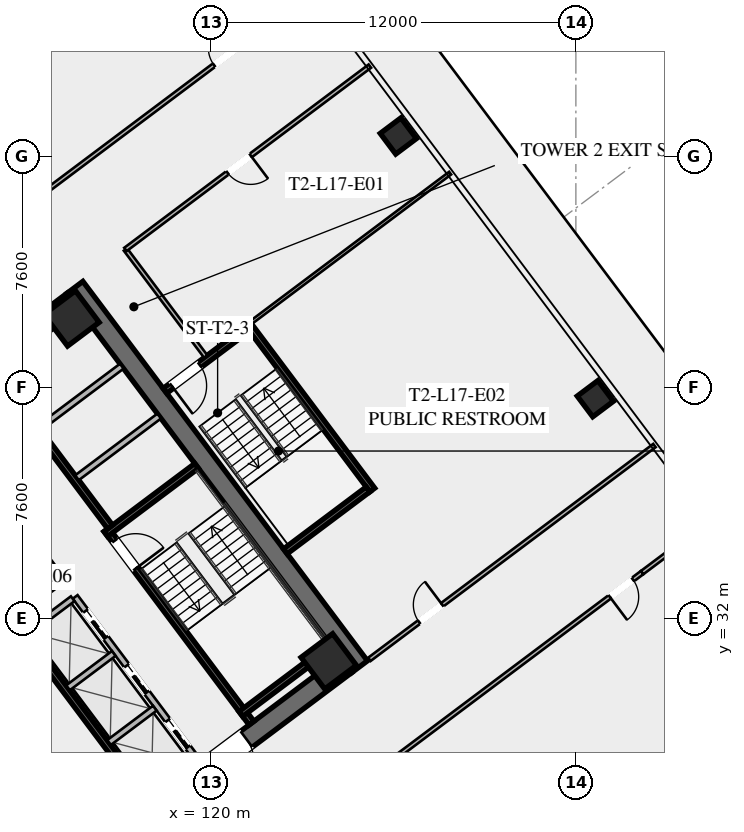
"""IFC4 building model, lengths in metres.
Left out: names, types, materials, properties, quantities, classifications, styles, units other than length and angle.
Written with IfcOpenShell. Run it as: python <this file> out.ifc"""

import sys

from ifc_helpers import new_model, si_unit, direction, frame, frame_2d, origin, origin_2d, place, context, subcontext, project, spatial, rectangle, hollow_rectangle, extrude, element, fill, save


model = new_model("IFC4")
c1 = context("Model", 3, precision=1e-05, world=origin(), true_north=direction((0.0, 1.0)))
c2 = subcontext(c1, "Body", "Model", "MODEL_VIEW")
j1 = project(units=[si_unit("LENGTHUNIT", "METRE"), si_unit("PLANEANGLEUNIT", "RADIAN")], contexts=[c1])
p1 = place(None, origin())
s1 = spatial("IfcSite", under=j1, at=p1, CompositionType="ELEMENT")
p2 = place(p1, origin())
s2 = spatial("IfcBuilding", under=s1, at=p2, CompositionType="ELEMENT")
p3 = place(p2, frame((0.0, 0.0, 67.2)))
s3 = spatial("IfcBuildingStorey", under=s2, at=p3, CompositionType="ELEMENT", Elevation=67.2)
p4 = place(p3, frame((115.524, 42.893, 0.0), z_axis=(0.0, 0.0, 1.0), x_axis=(0.600005007985, -0.799996243986, 0.0)))
e1 = element("IfcWall", 1, at=p4, inside=s3, PredefinedType="SHEAR", context=c2, shape_type="SweptSolid", body=[
    extrude(rectangle(XDim=15.6, YDim=0.65, at=frame_2d((7.8, 0.0))), origin(), (0.0, 0.0, 1.0), 3.55),
])
p5 = place(p3, frame((124.429, 30.478, 0.0), z_axis=(0.0, 0.0, 1.0), x_axis=(-0.799998028465, -0.600002628705, 0.0)))
e2 = element("IfcWall", 2, at=p5, inside=s3, PredefinedType="SHEAR", context=c2, shape_type="SweptSolid", body=[
    extrude(rectangle(XDim=14.86, YDim=0.65, at=frame_2d((7.43, 0.0))), origin(), (0.0, 0.0, 1.0), 3.55),
])
p6 = place(p5, frame((9.13, 0.0, 0.0)))
e3 = element("IfcOpeningElement", 3, at=p6, cuts=e2, PredefinedType="OPENING", context=c2, shape_type="SweptSolid", body=[
    extrude(rectangle(XDim=1.25, YDim=2.25, at=frame_2d((0.625, 1.125))), frame((0.0, 0.335, 0.0), z_axis=(0.0, -1.0, 0.0), x_axis=(1.0, 0.0, 0.0)), (0.0, 0.0, 1.0), 0.67),
])
p7 = place(p5, frame((4.08, 0.0, 0.0)))
e4 = element("IfcOpeningElement", 4, at=p7, cuts=e2, PredefinedType="OPENING", context=c2, shape_type="SweptSolid", body=[
    extrude(rectangle(XDim=1.25, YDim=2.25, at=frame_2d((0.625, 1.125))), frame((0.0, 0.335, 0.0), z_axis=(0.0, -1.0, 0.0), x_axis=(1.0, 0.0, 0.0)), (0.0, 0.0, 1.0), 0.67),
])
p8 = place(p3, frame((103.571, 33.522, 0.0), z_axis=(0.0, 0.0, 1.0), x_axis=(0.799998028465, 0.600002628705, 0.0)))
e5 = element("IfcWall", 5, at=p8, inside=s3, PredefinedType="SHEAR", context=c2, shape_type="SweptSolid", body=[
    extrude(rectangle(XDim=14.86, YDim=0.65, at=frame_2d((7.43, 0.0))), origin(), (0.0, 0.0, 1.0), 3.55),
])
p9 = place(p8, frame((4.48, 0.0, 0.0)))
e6 = element("IfcOpeningElement", 6, at=p9, cuts=e5, PredefinedType="OPENING", context=c2, shape_type="SweptSolid", body=[
    extrude(rectangle(XDim=1.25, YDim=2.25, at=frame_2d((0.625, 1.125))), frame((0.0, 0.335, 0.0), z_axis=(0.0, -1.0, 0.0), x_axis=(1.0, 0.0, 0.0)), (0.0, 0.0, 1.0), 0.67),
])
p10 = place(p8, frame((9.53, 0.0, 0.0)))
e7 = element("IfcOpeningElement", 7, at=p10, cuts=e5, PredefinedType="OPENING", context=c2, shape_type="SweptSolid", body=[
    extrude(rectangle(XDim=1.25, YDim=2.25, at=frame_2d((0.625, 1.125))), frame((0.0, 0.335, 0.0), z_axis=(0.0, -1.0, 0.0), x_axis=(1.0, 0.0, 0.0)), (0.0, 0.0, 1.0), 0.67),
])
for number, where, z_axis, x_axis in (
    (8, (123.87, 30.59, 0.0), (0.0, 0.0, 1.0), (0.8, 0.6, 0.0)),
    (9, (115.41, 41.87, 0.0), (0.0, 0.0, 1.0), (0.8, 0.6, 0.0)),
):
    element("IfcColumn", number, at=place(p3, frame(where, z_axis=z_axis, x_axis=x_axis)), inside=s3, PredefinedType="COLUMN", context=c2, shape_type="SweptSolid", body=[
        extrude(hollow_rectangle(XDim=1.3, YDim=1.3, WallThickness=0.05, at=origin_2d()), origin(), (0.0, 0.0, 1.0), 3.35),
    ])
for number, where, z_axis, x_axis in (
    (10, (132.64, 39.23, -0.195), (0.0, 0.0, 1.0), (0.8, 0.6, 0.0)),
    (11, (126.16, 47.87, -0.195), (0.0, 0.0, 1.0), (0.8, 0.6, 0.0)),
):
    element("IfcColumn", number, at=place(p3, frame(where, z_axis=z_axis, x_axis=x_axis)), inside=s3, PredefinedType="COLUMN", context=c2, shape_type="SweptSolid", body=[
        extrude(hollow_rectangle(XDim=0.85, YDim=0.85, WallThickness=0.035, at=origin_2d()), origin(), (0.0, 0.0, 1.0), 3.545),
    ])
p11 = place(p3, frame((116.56, 34.92, 0.0), z_axis=(0.0, 0.0, 1.0), x_axis=(0.600009827119, -0.799992629566, 0.0)))
e12 = element("IfcWall", 12, at=p11, inside=s3, PredefinedType="SHEAR", context=c2, shape_type="SweptSolid", body=[
    extrude(rectangle(XDim=7.95, YDim=0.2, at=frame_2d((3.975, 0.0))), origin(), (0.0, 0.0, 1.0), 3.35),
])
p12 = place(p11, frame((0.45, 0.0, 0.0)))
e13 = element("IfcOpeningElement", 13, at=p12, cuts=e12, PredefinedType="OPENING", context=c2, shape_type="SweptSolid", body=[
    extrude(rectangle(XDim=1.15, YDim=2.2, at=frame_2d((0.575, 1.1))), frame((0.0, 0.11, 0.0), z_axis=(0.0, -1.0, 0.0), x_axis=(1.0, 0.0, 0.0)), (0.0, 0.0, 1.0), 0.22),
])
for number, where, z_axis, x_axis in (
    (14, (116.54, 34.78, 0.0), (0.0, 0.0, 1.0), (0.8, 0.6, 0.0)),
    (15, (120.98, 28.86, 0.0), (0.0, 0.0, 1.0), (0.8, 0.6, 0.0)),
):
    element("IfcWall", number, at=place(p3, frame(where, z_axis=z_axis, x_axis=x_axis)), inside=s3, PredefinedType="SHEAR", context=c2, shape_type="SweptSolid", body=[
        extrude(rectangle(XDim=3.73, YDim=0.2, at=frame_2d((1.865, 0.0))), origin(), (0.0, 0.0, 1.0), 3.35),
    ])
p13 = place(p3, frame((117.938, 26.016, 0.0), z_axis=(0.0, 0.0, 1.0), x_axis=(-0.600005463273, 0.799995902516, 0.0)))
e16 = element("IfcWall", 16, at=p13, inside=s3, PredefinedType="SHEAR", context=c2, shape_type="SweptSolid", body=[
    extrude(rectangle(XDim=14.3, YDim=0.2, at=frame_2d((7.15, 0.0))), origin(), (0.0, 0.0, 1.0), 3.35),
])
p14 = place(p3, frame((115.13, 23.91, 0.0), z_axis=(0.0, 0.0, 1.0), x_axis=(-0.599975393228, 0.800018454488, 0.0)))
e17 = element("IfcWall", 17, at=p14, inside=s3, PredefinedType="SHEAR", context=c2, shape_type="SweptSolid", body=[
    extrude(rectangle(XDim=6.35, YDim=0.2, at=frame_2d((3.175, 0.0))), origin(), (0.0, 0.0, 1.0), 3.35),
])
p15 = place(p14, frame((4.775, 0.0, 0.0)))
e18 = element("IfcOpeningElement", 18, at=p15, cuts=e17, PredefinedType="OPENING", context=c2, shape_type="SweptSolid", body=[
    extrude(rectangle(XDim=1.3, YDim=2.25, at=frame_2d((0.65, 1.125))), frame((0.0, 0.11, 0.0), z_axis=(0.0, -1.0, 0.0), x_axis=(1.0, 0.0, 0.0)), (0.0, 0.0, 1.0), 0.22),
])
p16 = place(p14, frame((2.775, 0.0, 0.0)))
e19 = element("IfcOpeningElement", 19, at=p16, cuts=e17, PredefinedType="OPENING", context=c2, shape_type="SweptSolid", body=[
    extrude(rectangle(XDim=1.3, YDim=2.25, at=frame_2d((0.65, 1.125))), frame((0.0, 0.11, 0.0), z_axis=(0.0, -1.0, 0.0), x_axis=(1.0, 0.0, 0.0)), (0.0, 0.0, 1.0), 0.22),
])
p17 = place(p14, frame((0.575, 0.0, 0.0)))
e20 = element("IfcOpeningElement", 20, at=p17, cuts=e17, PredefinedType="OPENING", context=c2, shape_type="SweptSolid", body=[
    extrude(rectangle(XDim=1.3, YDim=2.25, at=frame_2d((0.65, 1.125))), frame((0.0, 0.11, 0.0), z_axis=(0.0, -1.0, 0.0), x_axis=(1.0, 0.0, 0.0)), (0.0, 0.0, 1.0), 0.22),
])
p18 = place(p3, frame((112.87, 40.09, 0.0), z_axis=(0.0, 0.0, 1.0), x_axis=(0.599975393228, -0.800018454488, 0.0)))
e21 = element("IfcWall", 21, at=p18, inside=s3, PredefinedType="SHEAR", context=c2, shape_type="SweptSolid", body=[
    extrude(rectangle(XDim=6.35, YDim=0.2, at=frame_2d((3.175, 0.0))), origin(), (0.0, 0.0, 1.0), 3.35),
])
for number, where, z_axis, x_axis in (
    (22, (115.59, 36.63, 0.0), (0.0, 0.0, 1.0), (0.8, 0.6, 0.0)),
    (23, (114.36, 38.27, 0.0), (0.0, 0.0, 1.0), (0.8, 0.6, 0.0)),
):
    element("IfcWall", number, at=place(p3, frame(where, z_axis=z_axis, x_axis=x_axis)), inside=s3, PredefinedType="SOLIDWALL", context=c2, shape_type="SweptSolid", body=[
        extrude(rectangle(XDim=3.38, YDim=0.2, at=frame_2d((1.69, 0.0))), origin(), (0.0, 0.0, 1.0), 3.35),
    ])
p19 = place(p3, frame((119.61, 27.27, 0.0), z_axis=(0.0, 0.0, 1.0), x_axis=(-0.600011488909, 0.79999138319, 0.0)))
e24 = element("IfcWall", 24, at=p19, inside=s3, PredefinedType="SOLIDWALL", context=c2, shape_type="SweptSolid", body=[
    extrude(rectangle(XDim=6.8, YDim=0.2, at=frame_2d((3.4, 0.0))), origin(), (0.0, 0.0, 1.0), 3.35),
])
p20 = place(p19, frame((0.625, 0.0, 0.0)))
e25 = element("IfcOpeningElement", 25, at=p20, cuts=e24, PredefinedType="OPENING", context=c2, shape_type="SweptSolid", body=[
    extrude(rectangle(XDim=1.1, YDim=2.2, at=frame_2d((0.55, 1.1))), frame((0.0, 0.11, 0.0), z_axis=(0.0, -1.0, 0.0), x_axis=(1.0, 0.0, 0.0)), (0.0, 0.0, 1.0), 0.22),
])
p21 = place(p19, frame((2.875, 0.0, 0.0)))
e26 = element("IfcOpeningElement", 26, at=p21, cuts=e24, PredefinedType="OPENING", context=c2, shape_type="SweptSolid", body=[
    extrude(rectangle(XDim=1.1, YDim=2.2, at=frame_2d((0.55, 1.1))), frame((0.0, 0.11, 0.0), z_axis=(0.0, -1.0, 0.0), x_axis=(1.0, 0.0, 0.0)), (0.0, 0.0, 1.0), 0.22),
])
p22 = place(p19, frame((5.125, 0.0, 0.0)))
e27 = element("IfcOpeningElement", 27, at=p22, cuts=e24, PredefinedType="OPENING", context=c2, shape_type="SweptSolid", body=[
    extrude(rectangle(XDim=1.1, YDim=2.2, at=frame_2d((0.55, 1.1))), frame((0.0, 0.11, 0.0), z_axis=(0.0, -1.0, 0.0), x_axis=(1.0, 0.0, 0.0)), (0.0, 0.0, 1.0), 0.22),
])
p23 = place(p3, frame((116.646, 27.922, 0.0), z_axis=(0.0, 0.0, 1.0), x_axis=(0.8, 0.6, 0.0)))
e28 = element("IfcWall", 28, at=p23, inside=s3, PredefinedType="SOLIDWALL", context=c2, shape_type="SweptSolid", body=[
    extrude(rectangle(XDim=1.88, YDim=0.2, at=frame_2d((0.94, 0.0))), origin(), (0.0, 0.0, 1.0), 3.35),
])
p24 = place(p3, frame((115.296, 29.722, 0.0), z_axis=(0.0, 0.0, 1.0), x_axis=(0.799984418148, 0.600020775241, 0.0)))
e29 = element("IfcWall", 29, at=p24, inside=s3, PredefinedType="SOLIDWALL", context=c2, shape_type="SweptSolid", body=[
    extrude(rectangle(XDim=1.88, YDim=0.2, at=frame_2d((0.94, 0.0))), origin(), (0.0, 0.0, 1.0), 3.35),
])
p25 = place(p3, frame((113.946, 31.522, 0.0), z_axis=(0.0, 0.0, 1.0), x_axis=(0.8, 0.6, 0.0)))
e30 = element("IfcWall", 30, at=p25, inside=s3, PredefinedType="SOLIDWALL", context=c2, shape_type="SweptSolid", body=[
    extrude(rectangle(XDim=1.88, YDim=0.2, at=frame_2d((0.94, 0.0))), origin(), (0.0, 0.0, 1.0), 3.35),
])
p26 = place(p3, frame((115.11, 33.27, 0.0), z_axis=(0.0, 0.0, 1.0), x_axis=(-0.600011488909, 0.79999138319, 0.0)))
e31 = element("IfcWall", 31, at=p26, inside=s3, PredefinedType="SOLIDWALL", context=c2, shape_type="SweptSolid", body=[
    extrude(rectangle(XDim=6.8, YDim=0.2, at=frame_2d((3.4, 0.0))), origin(), (0.0, 0.0, 1.0), 3.35),
])
p27 = place(p3, frame((113.526, 32.082, 0.0), z_axis=(0.0, 0.0, 1.0), x_axis=(0.800046745961, 0.599937666993, 0.0)))
e32 = element("IfcWall", 32, at=p27, inside=s3, PredefinedType="SOLIDWALL", context=c2, shape_type="SweptSolid", body=[
    extrude(rectangle(XDim=1.88, YDim=0.2, at=frame_2d((0.94, 0.0))), origin(), (0.0, 0.0, 1.0), 3.35),
])
p28 = place(p3, frame((125.304, 36.228, 0.0), z_axis=(0.0, 0.0, 1.0), x_axis=(-0.59998851072, 0.800008616831, 0.0)))
e33 = element("IfcWall", 33, at=p28, inside=s3, PredefinedType="SHEAR", context=c2, shape_type="SweptSolid", body=[
    extrude(rectangle(XDim=6.8, YDim=0.2, at=frame_2d((3.4, 0.0))), origin(), (0.0, 0.0, 1.0), 3.35),
])
p29 = place(p3, frame((121.204, 41.528, 0.0), z_axis=(0.0, 0.0, 1.0), x_axis=(-0.800017232136, -0.599977023131, 0.0)))
e34 = element("IfcWall", 34, at=p29, inside=s3, PredefinedType="SHEAR", context=c2, shape_type="SweptSolid", body=[
    extrude(rectangle(XDim=3.4, YDim=0.2, at=frame_2d((1.7, 0.0))), origin(), (0.0, 0.0, 1.0), 3.35),
])
p30 = place(p29, frame((1.975, 0.0, 0.0)))
e35 = element("IfcOpeningElement", 35, at=p30, cuts=e34, PredefinedType="OPENING", context=c2, shape_type="SweptSolid", body=[
    extrude(rectangle(XDim=1.15, YDim=2.2, at=frame_2d((0.575, 1.1))), frame((0.0, 0.11, 0.0), z_axis=(0.0, -1.0, 0.0), x_axis=(1.0, 0.0, 0.0)), (0.0, 0.0, 1.0), 0.22),
])
p31 = place(p3, frame((122.444, 34.208, 0.0), z_axis=(0.0, 0.0, 1.0), x_axis=(0.79999138319, 0.600011488909, 0.0)))
e36 = element("IfcWall", 36, at=p31, inside=s3, PredefinedType="SHEAR", context=c2, shape_type="SweptSolid", body=[
    extrude(rectangle(XDim=3.4, YDim=0.2, at=frame_2d((1.7, 0.0))), origin(), (0.0, 0.0, 1.0), 3.35),
])
p32 = place(p3, frame((119.824, 40.618, 0.0), z_axis=(0.0, 0.0, 1.0), x_axis=(-0.599982243973, 0.800013316712, 0.0)))
e37 = element("IfcWall", 37, at=p32, inside=s3, PredefinedType="PARTITIONING", context=c2, shape_type="SweptSolid", body=[
    extrude(rectangle(XDim=4.4, YDim=0.135, at=frame_2d((2.2, 0.0))), origin(), (0.0, 0.0, 1.0), 2.703),
])
p33 = place(p3, frame((98.516, 34.012, 0.0), z_axis=(0.0, 0.0, 1.0), x_axis=(0.8, 0.6, 0.0)))
e38 = element("IfcWall", 38, at=p33, inside=s3, PredefinedType="PARTITIONING", context=c2, shape_type="SweptSolid", body=[
    extrude(rectangle(XDim=28.23, YDim=0.135, at=frame_2d((14.115, 0.0))), origin(), (0.0, 0.0, 1.0), 2.703),
])
p34 = place(p33, frame((0.3, 0.0, 0.0)))
e39 = element("IfcOpeningElement", 39, at=p34, cuts=e38, PredefinedType="OPENING", context=c2, shape_type="SweptSolid", body=[
    extrude(rectangle(XDim=0.95, YDim=2.05, at=frame_2d((0.475, 1.025))), frame((0.0, 0.077, 0.0), z_axis=(0.0, -1.0, 0.0), x_axis=(1.0, 0.0, 0.0)), (0.0, 0.0, 1.0), 0.155),
])
p35 = place(p33, frame((6.84, 0.0, 0.0)))
e40 = element("IfcOpeningElement", 40, at=p35, cuts=e38, PredefinedType="OPENING", context=c2, shape_type="SweptSolid", body=[
    extrude(rectangle(XDim=0.95, YDim=2.05, at=frame_2d((0.475, 1.025))), frame((0.0, 0.077, 0.0), z_axis=(0.0, -1.0, 0.0), x_axis=(1.0, 0.0, 0.0)), (0.0, 0.0, 1.0), 0.155),
])
p36 = place(p33, frame((10.863, 0.0, 0.0)))
e41 = element("IfcOpeningElement", 41, at=p36, cuts=e38, PredefinedType="OPENING", context=c2, shape_type="SweptSolid", body=[
    extrude(rectangle(XDim=0.95, YDim=2.05, at=frame_2d((0.475, 1.025))), frame((0.0, 0.077, 0.0), z_axis=(0.0, -1.0, 0.0), x_axis=(1.0, 0.0, 0.0)), (0.0, 0.0, 1.0), 0.155),
])
p37 = place(p33, frame((26.98, 0.0, 0.0)))
e42 = element("IfcOpeningElement", 42, at=p37, cuts=e38, PredefinedType="OPENING", context=c2, shape_type="SweptSolid", body=[
    extrude(rectangle(XDim=0.95, YDim=2.05, at=frame_2d((0.475, 1.025))), frame((0.0, 0.077, 0.0), z_axis=(0.0, -1.0, 0.0), x_axis=(1.0, 0.0, 0.0)), (0.0, 0.0, 1.0), 0.155),
])
p38 = place(p3, frame((134.18, 33.51, 0.0), z_axis=(0.0, 0.0, 1.0), x_axis=(-0.8, -0.6, 0.0)))
e43 = element("IfcWall", 43, at=p38, inside=s3, PredefinedType="PARTITIONING", context=c2, shape_type="SweptSolid", body=[
    extrude(rectangle(XDim=28.23, YDim=0.135, at=frame_2d((14.115, 0.0))), origin(), (0.0, 0.0, 1.0), 2.703),
])
p39 = place(p38, frame((26.9, 0.0, 0.0)))
e44 = element("IfcOpeningElement", 44, at=p39, cuts=e43, PredefinedType="OPENING", context=c2, shape_type="SweptSolid", body=[
    extrude(rectangle(XDim=0.95, YDim=2.05, at=frame_2d((0.475, 1.025))), frame((0.0, 0.077, 0.0), z_axis=(0.0, -1.0, 0.0), x_axis=(1.0, 0.0, 0.0)), (0.0, 0.0, 1.0), 0.155),
])
p40 = place(p38, frame((20.399, 0.0, 0.0)))
e45 = element("IfcOpeningElement", 45, at=p40, cuts=e43, PredefinedType="OPENING", context=c2, shape_type="SweptSolid", body=[
    extrude(rectangle(XDim=0.95, YDim=2.05, at=frame_2d((0.475, 1.025))), frame((0.0, 0.077, 0.0), z_axis=(0.0, -1.0, 0.0), x_axis=(1.0, 0.0, 0.0)), (0.0, 0.0, 1.0), 0.155),
])
p41 = place(p38, frame((16.339, 0.0, 0.0)))
e46 = element("IfcOpeningElement", 46, at=p41, cuts=e43, PredefinedType="OPENING", context=c2, shape_type="SweptSolid", body=[
    extrude(rectangle(XDim=0.95, YDim=2.05, at=frame_2d((0.475, 1.025))), frame((0.0, 0.077, 0.0), z_axis=(0.0, -1.0, 0.0), x_axis=(1.0, 0.0, 0.0)), (0.0, 0.0, 1.0), 0.155),
])
p42 = place(p38, frame((0.38, 0.0, 0.0)))
e47 = element("IfcOpeningElement", 47, at=p42, cuts=e43, PredefinedType="OPENING", context=c2, shape_type="SweptSolid", body=[
    extrude(rectangle(XDim=0.95, YDim=2.05, at=frame_2d((0.475, 1.025))), frame((0.0, 0.077, 0.0), z_axis=(0.0, -1.0, 0.0), x_axis=(1.0, 0.0, 0.0)), (0.0, 0.0, 1.0), 0.155),
])
p43 = place(p3, frame((134.18, 33.51, 0.0), z_axis=(0.0, 0.0, 1.0), x_axis=(0.8000207031, 0.599972394874, 0.0)))
e48 = element("IfcWall", 48, at=p43, inside=s3, PredefinedType="PARTITIONING", context=c2, shape_type="SweptSolid", body=[
    extrude(rectangle(XDim=2.83, YDim=0.135, at=frame_2d((1.415, 0.0))), origin(), (0.0, 0.0, 1.0), 2.703),
])
p44 = place(p3, frame((125.224, 50.168, 0.0), z_axis=(0.0, 0.0, 1.0), x_axis=(-0.8, -0.6, 0.0)))
e49 = element("IfcWall", 49, at=p44, inside=s3, PredefinedType="PARTITIONING", context=c2, shape_type="SweptSolid", body=[
    extrude(rectangle(XDim=10.05, YDim=0.135, at=frame_2d((5.025, 0.0))), origin(), (0.0, 0.0, 1.0), 2.703),
])
p45 = place(p44, frame((4.9, 0.0, 0.0)))
e50 = element("IfcOpeningElement", 50, at=p45, cuts=e49, PredefinedType="OPENING", context=c2, shape_type="SweptSolid", body=[
    extrude(rectangle(XDim=0.95, YDim=2.05, at=frame_2d((0.475, 1.025))), frame((0.0, 0.077, 0.0), z_axis=(0.0, -1.0, 0.0), x_axis=(1.0, 0.0, 0.0)), (0.0, 0.0, 1.0), 0.155),
])
p46 = place(p3, frame((125.208, 30.656, 0.0), z_axis=(0.0, 0.0, 1.0), x_axis=(0.8, 0.6, 0.0)))
e51 = element("IfcWall", 51, at=p46, inside=s3, PredefinedType="PARTITIONING", context=c2, shape_type="SweptSolid", body=[
    extrude(rectangle(XDim=11.72, YDim=0.135, at=frame_2d((5.86, 0.0))), origin(), (0.0, 0.0, 1.0), 2.703),
])
p47 = place(p46, frame((2.045, 0.0, 0.0)))
e52 = element("IfcOpeningElement", 52, at=p47, cuts=e51, PredefinedType="OPENING", context=c2, shape_type="SweptSolid", body=[
    extrude(rectangle(XDim=0.95, YDim=2.05, at=frame_2d((0.475, 1.025))), frame((0.0, 0.077, 0.0), z_axis=(0.0, -1.0, 0.0), x_axis=(1.0, 0.0, 0.0)), (0.0, 0.0, 1.0), 0.155),
])
p48 = place(p3, frame((127.864, 46.648, 0.0), z_axis=(0.0, 0.0, 1.0), x_axis=(-0.800007145523, -0.599990472518, 0.0)))
e53 = element("IfcWall", 53, at=p48, inside=s3, PredefinedType="PARTITIONING", context=c2, shape_type="SweptSolid", body=[
    extrude(rectangle(XDim=8.2, YDim=0.11, at=frame_2d((4.1, 0.0))), origin(), (0.0, 0.0, 1.0), 2.703),
])
p49 = place(p7, origin())
e54 = element("IfcDoor", 54, at=p49, inside=s3, OperationType="SINGLE_SWING_RIGHT", PredefinedType="DOOR", context=c2, shape_type="SweptSolid", body=[
    extrude(rectangle(XDim=1.25, YDim=2.25, at=frame_2d((0.625, 1.125))), frame((0.0, 0.025, 0.0), z_axis=(0.0, -1.0, 0.0), x_axis=(1.0, 0.0, 0.0)), (0.0, 0.0, 1.0), 0.05),
])
fill(e4, e54)
p50 = place(p12, origin())
e55 = element("IfcDoor", 55, at=p50, inside=s3, OperationType="SINGLE_SWING_RIGHT", PredefinedType="DOOR", context=c2, shape_type="SweptSolid", body=[
    extrude(rectangle(XDim=1.15, YDim=2.2, at=frame_2d((0.575, 1.1))), frame((0.0, 0.025, 0.0), z_axis=(0.0, -1.0, 0.0), x_axis=(1.0, 0.0, 0.0)), (0.0, 0.0, 1.0), 0.05),
])
fill(e13, e55)
p51 = place(p30, origin())
e56 = element("IfcDoor", 56, at=p51, inside=s3, OperationType="SINGLE_SWING_RIGHT", PredefinedType="DOOR", context=c2, shape_type="SweptSolid", body=[
    extrude(rectangle(XDim=1.15, YDim=2.2, at=frame_2d((0.575, 1.1))), frame((0.0, 0.025, 0.0), z_axis=(0.0, -1.0, 0.0), x_axis=(1.0, 0.0, 0.0)), (0.0, 0.0, 1.0), 0.05),
])
fill(e35, e56)
p52 = place(p37, origin())
e57 = element("IfcDoor", 57, at=p52, inside=s3, OperationType="SINGLE_SWING_RIGHT", PredefinedType="DOOR", context=c2, shape_type="SweptSolid", body=[
    extrude(rectangle(XDim=0.95, YDim=2.05, at=frame_2d((0.475, 1.025))), frame((0.0, 0.025, 0.0), z_axis=(0.0, -1.0, 0.0), x_axis=(1.0, 0.0, 0.0)), (0.0, 0.0, 1.0), 0.05),
])
fill(e42, e57)
p53 = place(p42, origin())
e58 = element("IfcDoor", 58, at=p53, inside=s3, OperationType="SINGLE_SWING_RIGHT", PredefinedType="DOOR", context=c2, shape_type="SweptSolid", body=[
    extrude(rectangle(XDim=0.95, YDim=2.05, at=frame_2d((0.475, 1.025))), frame((0.0, 0.025, 0.0), z_axis=(0.0, -1.0, 0.0), x_axis=(1.0, 0.0, 0.0)), (0.0, 0.0, 1.0), 0.05),
])
fill(e47, e58)
p54 = place(p45, origin())
e59 = element("IfcDoor", 59, at=p54, inside=s3, OperationType="SINGLE_SWING_LEFT", PredefinedType="DOOR", context=c2, shape_type="SweptSolid", body=[
    extrude(rectangle(XDim=0.95, YDim=2.05, at=frame_2d((0.475, 1.025))), frame((0.0, 0.025, 0.0), z_axis=(0.0, -1.0, 0.0), x_axis=(1.0, 0.0, 0.0)), (0.0, 0.0, 1.0), 0.05),
])
fill(e50, e59)
p55 = place(p47, origin())
e60 = element("IfcDoor", 60, at=p55, inside=s3, OperationType="SINGLE_SWING_RIGHT", PredefinedType="DOOR", context=c2, shape_type="SweptSolid", body=[
    extrude(rectangle(XDim=0.95, YDim=2.05, at=frame_2d((0.475, 1.025))), frame((0.0, 0.025, 0.0), z_axis=(0.0, -1.0, 0.0), x_axis=(1.0, 0.0, 0.0)), (0.0, 0.0, 1.0), 0.05),
])
fill(e52, e60)
p56 = place(p20, origin())
e61 = element("IfcDoor", 61, at=p56, inside=s3, OperationType="SLIDING_TO_LEFT", PredefinedType="DOOR", context=c2, shape_type="SweptSolid", body=[
    extrude(rectangle(XDim=1.1, YDim=2.2, at=frame_2d((0.55, 1.1))), frame((0.0, 0.025, 0.0), z_axis=(0.0, -1.0, 0.0), x_axis=(1.0, 0.0, 0.0)), (0.0, 0.0, 1.0), 0.05),
])
fill(e25, e61)
p57 = place(p21, origin())
e62 = element("IfcDoor", 62, at=p57, inside=s3, OperationType="SLIDING_TO_LEFT", PredefinedType="DOOR", context=c2, shape_type="SweptSolid", body=[
    extrude(rectangle(XDim=1.1, YDim=2.2, at=frame_2d((0.55, 1.1))), frame((0.0, 0.025, 0.0), z_axis=(0.0, -1.0, 0.0), x_axis=(1.0, 0.0, 0.0)), (0.0, 0.0, 1.0), 0.05),
])
fill(e26, e62)
p58 = place(p22, origin())
e63 = element("IfcDoor", 63, at=p58, inside=s3, OperationType="SLIDING_TO_LEFT", PredefinedType="DOOR", context=c2, shape_type="SweptSolid", body=[
    extrude(rectangle(XDim=1.1, YDim=2.2, at=frame_2d((0.55, 1.1))), frame((0.0, 0.025, 0.0), z_axis=(0.0, -1.0, 0.0), x_axis=(1.0, 0.0, 0.0)), (0.0, 0.0, 1.0), 0.05),
])
fill(e27, e63)
save(model, sys.argv[1])
